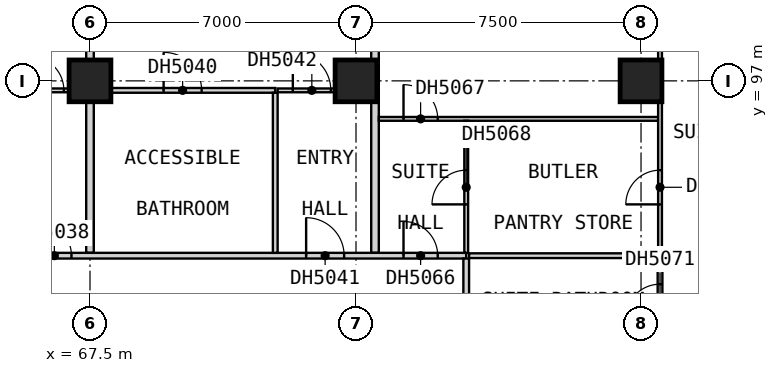
"""IFC4 building model, lengths in metres.
Left out: names, types, materials, properties, quantities, classifications, styles, units other than length and angle.
Written with IfcOpenShell. Run it as: python <this file> out.ifc"""

import sys

from ifc_helpers import new_model, si_unit, direction, frame, frame_2d, origin, origin_2d, place, context, subcontext, project, spatial, rectangle, extrude, element, fill, save


model = new_model("IFC4")
c1 = context("Model", 3, precision=1e-05, world=origin(), true_north=direction((0.0, 1.0)))
c2 = subcontext(c1, "Body", "Model", "MODEL_VIEW")
j1 = project(units=[si_unit("LENGTHUNIT", "METRE"), si_unit("PLANEANGLEUNIT", "RADIAN")], contexts=[c1])
p1 = place(None, origin())
s1 = spatial("IfcSite", under=j1, at=p1, CompositionType="ELEMENT")
p2 = place(p1, origin())
s2 = spatial("IfcBuilding", under=s1, at=p2, CompositionType="ELEMENT")
p3 = place(p2, frame((0.0, 0.0, 79.1)))
s3 = spatial("IfcBuildingStorey", under=s2, at=p3, CompositionType="ELEMENT", Elevation=79.1)
for number, where, z_axis, x_axis in (
    (1, (67.5, 97.0, 0.0), (0.0, 0.0, 1.0), (1.0, 0.0, 0.0)),
    (2, (74.5, 97.0, 0.0), (0.0, 0.0, 1.0), (1.0, 0.0, 0.0)),
    (3, (82.0, 97.0, 0.0), (0.0, 0.0, 1.0), (1.0, 0.0, 0.0)),
):
    element("IfcColumn", number, at=place(p3, frame(where, z_axis=z_axis, x_axis=x_axis)), inside=s3, PredefinedType="COLUMN", context=c2, shape_type="SweptSolid", body=[
        extrude(rectangle(XDim=1.1, YDim=1.1, at=origin_2d()), origin(), (0.0, 0.0, 1.0), 3.6),
    ])
p4 = place(p3, frame((67.5, 92.475, 0.0), z_axis=(0.0, 0.0, 1.0), x_axis=(0.0, 1.0, 0.0)))
e4 = element("IfcWall", 4, at=p4, inside=s3, PredefinedType="PARTITIONING", context=c2, shape_type="SweptSolid", body=[
    extrude(rectangle(XDim=12.525, YDim=0.2, at=frame_2d((6.262, 0.0))), origin(), (0.0, 0.0, 1.0), 3.35),
])
p5 = place(p3, frame((75.0, 92.475, 0.0), z_axis=(0.0, 0.0, 1.0), x_axis=(0.0, 1.0, 0.0)))
e5 = element("IfcWall", 5, at=p5, inside=s3, PredefinedType="PARTITIONING", context=c2, shape_type="SweptSolid", body=[
    extrude(rectangle(XDim=11.715, YDim=0.2, at=frame_2d((5.857, 0.0))), origin(), (0.0, 0.0, 1.0), 3.35),
])
p6 = place(p3, frame((33.75, 92.4, 0.0), z_axis=(0.0, 0.0, 1.0), x_axis=(1.0, 0.0, 0.0)))
e6 = element("IfcWall", 6, at=p6, inside=s3, PredefinedType="PARTITIONING", context=c2, shape_type="SweptSolid", body=[
    extrude(rectangle(XDim=43.65, YDim=0.15, at=frame_2d((21.825, 0.0))), origin(), (0.0, 0.0, 1.0), 3.35),
])
p7 = place(p6, frame((5.175, 0.0, 0.0)))
e7 = element("IfcOpeningElement", 7, at=p7, cuts=e6, PredefinedType="OPENING", context=c2, shape_type="SweptSolid", body=[
    extrude(rectangle(XDim=0.9, YDim=2.1, at=frame_2d((0.45, 1.05))), frame((0.0, 0.085, 0.0), z_axis=(0.0, -1.0, 0.0), x_axis=(1.0, 0.0, 0.0)), (0.0, 0.0, 1.0), 0.17),
])
p8 = place(p6, frame((13.05, 0.0, 0.0)))
e8 = element("IfcOpeningElement", 8, at=p8, cuts=e6, PredefinedType="OPENING", context=c2, shape_type="SweptSolid", body=[
    extrude(rectangle(XDim=0.9, YDim=2.1, at=frame_2d((0.45, 1.05))), frame((0.0, 0.085, 0.0), z_axis=(0.0, -1.0, 0.0), x_axis=(1.0, 0.0, 0.0)), (0.0, 0.0, 1.0), 0.17),
])
p9 = place(p6, frame((17.363, 0.0, 0.0)))
e9 = element("IfcOpeningElement", 9, at=p9, cuts=e6, PredefinedType="OPENING", context=c2, shape_type="SweptSolid", body=[
    extrude(rectangle(XDim=0.9, YDim=2.1, at=frame_2d((0.45, 1.05))), frame((0.0, 0.085, 0.0), z_axis=(0.0, -1.0, 0.0), x_axis=(1.0, 0.0, 0.0)), (0.0, 0.0, 1.0), 0.17),
])
p10 = place(p6, frame((24.3, 0.0, 0.0)))
e10 = element("IfcOpeningElement", 10, at=p10, cuts=e6, PredefinedType="OPENING", context=c2, shape_type="SweptSolid", body=[
    extrude(rectangle(XDim=0.9, YDim=2.1, at=frame_2d((0.45, 1.05))), frame((0.0, 0.085, 0.0), z_axis=(0.0, -1.0, 0.0), x_axis=(1.0, 0.0, 0.0)), (0.0, 0.0, 1.0), 0.17),
])
p11 = place(p6, frame((28.613, 0.0, 0.0)))
e11 = element("IfcOpeningElement", 11, at=p11, cuts=e6, PredefinedType="OPENING", context=c2, shape_type="SweptSolid", body=[
    extrude(rectangle(XDim=0.9, YDim=2.1, at=frame_2d((0.45, 1.05))), frame((0.0, 0.085, 0.0), z_axis=(0.0, -1.0, 0.0), x_axis=(1.0, 0.0, 0.0)), (0.0, 0.0, 1.0), 0.17),
])
p12 = place(p6, frame((32.363, 0.0, 0.0)))
e12 = element("IfcOpeningElement", 12, at=p12, cuts=e6, PredefinedType="OPENING", context=c2, shape_type="SweptSolid", body=[
    extrude(rectangle(XDim=0.9, YDim=2.1, at=frame_2d((0.45, 1.05))), frame((0.0, 0.085, 0.0), z_axis=(0.0, -1.0, 0.0), x_axis=(1.0, 0.0, 0.0)), (0.0, 0.0, 1.0), 0.17),
])
p13 = place(p6, frame((39.438, 0.0, 0.0)))
e13 = element("IfcOpeningElement", 13, at=p13, cuts=e6, PredefinedType="OPENING", context=c2, shape_type="SweptSolid", body=[
    extrude(rectangle(XDim=1.0, YDim=2.1, at=frame_2d((0.5, 1.05))), frame((0.0, 0.085, 0.0), z_axis=(0.0, -1.0, 0.0), x_axis=(1.0, 0.0, 0.0)), (0.0, 0.0, 1.0), 0.17),
])
p14 = place(p6, frame((42.0, 0.0, 0.0)))
e14 = element("IfcOpeningElement", 14, at=p14, cuts=e6, PredefinedType="OPENING", context=c2, shape_type="SweptSolid", body=[
    extrude(rectangle(XDim=0.9, YDim=2.1, at=frame_2d((0.45, 1.05))), frame((0.0, 0.085, 0.0), z_axis=(0.0, -1.0, 0.0), x_axis=(1.0, 0.0, 0.0)), (0.0, 0.0, 1.0), 0.17),
])
p15 = place(p3, frame((77.4, 50.175, 0.0), z_axis=(0.0, 0.0, 1.0), x_axis=(0.0, 1.0, 0.0)))
e15 = element("IfcWall", 15, at=p15, inside=s3, PredefinedType="PARTITIONING", context=c2, shape_type="SweptSolid", body=[
    extrude(rectangle(XDim=42.15, YDim=0.15, at=frame_2d((21.075, 0.0))), origin(), (0.0, 0.0, 1.0), 3.35),
])
p16 = place(p15, frame((4.125, 0.0, 0.0)))
e16 = element("IfcOpeningElement", 16, at=p16, cuts=e15, PredefinedType="OPENING", context=c2, shape_type="SweptSolid", body=[
    extrude(rectangle(XDim=0.9, YDim=2.1, at=frame_2d((0.45, 1.05))), frame((0.0, 0.085, 0.0), z_axis=(0.0, -1.0, 0.0), x_axis=(1.0, 0.0, 0.0)), (0.0, 0.0, 1.0), 0.17),
])
p17 = place(p15, frame((19.125, 0.0, 0.0)))
e17 = element("IfcOpeningElement", 17, at=p17, cuts=e15, PredefinedType="OPENING", context=c2, shape_type="SweptSolid", body=[
    extrude(rectangle(XDim=0.9, YDim=2.1, at=frame_2d((0.45, 1.05))), frame((0.0, 0.085, 0.0), z_axis=(0.0, -1.0, 0.0), x_axis=(1.0, 0.0, 0.0)), (0.0, 0.0, 1.0), 0.17),
])
p18 = place(p15, frame((26.625, 0.0, 0.0)))
e18 = element("IfcOpeningElement", 18, at=p18, cuts=e15, PredefinedType="OPENING", context=c2, shape_type="SweptSolid", body=[
    extrude(rectangle(XDim=0.9, YDim=2.1, at=frame_2d((0.45, 1.05))), frame((0.0, 0.085, 0.0), z_axis=(0.0, -1.0, 0.0), x_axis=(1.0, 0.0, 0.0)), (0.0, 0.0, 1.0), 0.17),
])
p19 = place(p15, frame((30.938, 0.0, 0.0)))
e19 = element("IfcOpeningElement", 19, at=p19, cuts=e15, PredefinedType="OPENING", context=c2, shape_type="SweptSolid", body=[
    extrude(rectangle(XDim=0.9, YDim=2.1, at=frame_2d((0.45, 1.05))), frame((0.0, 0.085, 0.0), z_axis=(0.0, -1.0, 0.0), x_axis=(1.0, 0.0, 0.0)), (0.0, 0.0, 1.0), 0.17),
])
p20 = place(p15, frame((38.012, 0.0, 0.0)))
e20 = element("IfcOpeningElement", 20, at=p20, cuts=e15, PredefinedType="OPENING", context=c2, shape_type="SweptSolid", body=[
    extrude(rectangle(XDim=1.0, YDim=2.1, at=frame_2d((0.5, 1.05))), frame((0.0, 0.085, 0.0), z_axis=(0.0, -1.0, 0.0), x_axis=(1.0, 0.0, 0.0)), (0.0, 0.0, 1.0), 0.17),
])
p21 = place(p3, frame((75.1, 96.0, 0.0), z_axis=(0.0, 0.0, 1.0), x_axis=(1.0, 0.0, 0.0)))
e21 = element("IfcWall", 21, at=p21, inside=s3, PredefinedType="PARTITIONING", context=c2, shape_type="SweptSolid", body=[
    extrude(rectangle(XDim=7.35, YDim=0.1, at=frame_2d((3.675, 0.0))), origin(), (0.0, 0.0, 1.0), 3.35),
])
p22 = place(p21, frame((0.65, 0.0, 0.0)))
e22 = element("IfcOpeningElement", 22, at=p22, cuts=e21, PredefinedType="OPENING", context=c2, shape_type="SweptSolid", body=[
    extrude(rectangle(XDim=0.9, YDim=2.1, at=frame_2d((0.45, 1.05))), frame((0.0, 0.06, 0.0), z_axis=(0.0, -1.0, 0.0), x_axis=(1.0, 0.0, 0.0)), (0.0, 0.0, 1.0), 0.12),
])
p23 = place(p3, frame((65.688, 96.75, 0.0), z_axis=(0.0, 0.0, 1.0), x_axis=(1.0, 0.0, 0.0)))
e23 = element("IfcWall", 23, at=p23, inside=s3, PredefinedType="PARTITIONING", context=c2, shape_type="SweptSolid", body=[
    extrude(rectangle(XDim=1.712, YDim=0.1, at=frame_2d((0.856, 0.0))), origin(), (0.0, 0.0, 1.0), 3.35),
])
p24 = place(p23, frame((0.225, 0.0, 0.0)))
e24 = element("IfcOpeningElement", 24, at=p24, cuts=e23, PredefinedType="OPENING", context=c2, shape_type="SweptSolid", body=[
    extrude(rectangle(XDim=0.9, YDim=2.1, at=frame_2d((0.45, 1.05))), frame((0.0, 0.06, 0.0), z_axis=(0.0, -1.0, 0.0), x_axis=(1.0, 0.0, 0.0)), (0.0, 0.0, 1.0), 0.12),
])
p25 = place(p3, frame((72.438, 96.75, 0.0), z_axis=(0.0, 0.0, 1.0), x_axis=(1.0, 0.0, 0.0)))
e25 = element("IfcWall", 25, at=p25, inside=s3, PredefinedType="PARTITIONING", context=c2, shape_type="SweptSolid", body=[
    extrude(rectangle(XDim=2.462, YDim=0.1, at=frame_2d((1.231, 0.0))), origin(), (0.0, 0.0, 1.0), 3.35),
])
p26 = place(p25, frame((0.4, 0.0, 0.0)))
e26 = element("IfcOpeningElement", 26, at=p26, cuts=e25, PredefinedType="OPENING", context=c2, shape_type="SweptSolid", body=[
    extrude(rectangle(XDim=1.0, YDim=2.1, at=frame_2d((0.5, 1.05))), frame((0.0, 0.06, 0.0), z_axis=(0.0, -1.0, 0.0), x_axis=(1.0, 0.0, 0.0)), (0.0, 0.0, 1.0), 0.12),
])
p27 = place(p3, frame((77.4, 92.475, 0.0), z_axis=(0.0, 0.0, 1.0), x_axis=(0.0, 1.0, 0.0)))
e27 = element("IfcWall", 27, at=p27, inside=s3, PredefinedType="PARTITIONING", context=c2, shape_type="SweptSolid", body=[
    extrude(rectangle(XDim=3.475, YDim=0.1, at=frame_2d((1.737, 0.0))), origin(), (0.0, 0.0, 1.0), 3.35),
])
p28 = place(p27, frame((1.275, 0.0, 0.0)))
e28 = element("IfcOpeningElement", 28, at=p28, cuts=e27, PredefinedType="OPENING", context=c2, shape_type="SweptSolid", body=[
    extrude(rectangle(XDim=0.9, YDim=2.1, at=frame_2d((0.45, 1.05))), frame((0.0, 0.06, 0.0), z_axis=(0.0, -1.0, 0.0), x_axis=(1.0, 0.0, 0.0)), (0.0, 0.0, 1.0), 0.12),
])
p29 = place(p3, frame((82.5, 92.462, 0.0), z_axis=(0.0, 0.0, 1.0), x_axis=(0.0, 1.0, 0.0)))
e29 = element("IfcWall", 29, at=p29, inside=s3, PredefinedType="PARTITIONING", context=c2, shape_type="SweptSolid", body=[
    extrude(rectangle(XDim=11.728, YDim=0.1, at=frame_2d((5.864, 0.0))), origin(), (0.0, 0.0, 1.0), 3.35),
])
p30 = place(p29, frame((10.212, 0.0, 0.0)))
e30 = element("IfcOpeningElement", 30, at=p30, cuts=e29, PredefinedType="OPENING", context=c2, shape_type="SweptSolid", body=[
    extrude(rectangle(XDim=0.9, YDim=2.1, at=frame_2d((0.45, 1.05))), frame((0.0, 0.06, 0.0), z_axis=(0.0, -1.0, 0.0), x_axis=(1.0, 0.0, 0.0)), (0.0, 0.0, 1.0), 0.12),
])
p31 = place(p29, frame((1.288, 0.0, 0.0)))
e31 = element("IfcOpeningElement", 31, at=p31, cuts=e29, PredefinedType="OPENING", context=c2, shape_type="SweptSolid", body=[
    extrude(rectangle(XDim=0.9, YDim=2.1, at=frame_2d((0.45, 1.05))), frame((0.0, 0.06, 0.0), z_axis=(0.0, -1.0, 0.0), x_axis=(1.0, 0.0, 0.0)), (0.0, 0.0, 1.0), 0.12),
])
p32 = place(p3, frame((77.475, 92.4, 0.0), z_axis=(0.0, 0.0, 1.0), x_axis=(1.0, 0.0, 0.0)))
e32 = element("IfcWall", 32, at=p32, inside=s3, PredefinedType="PARTITIONING", context=c2, shape_type="SweptSolid", body=[
    extrude(rectangle(XDim=5.025, YDim=0.125, at=frame_2d((2.512, 0.0))), origin(), (0.0, 0.0, 1.0), 3.35),
])
p33 = place(p3, frame((67.6, 96.75, 0.0), z_axis=(0.0, 0.0, 1.0), x_axis=(1.0, 0.0, 0.0)))
e33 = element("IfcWall", 33, at=p33, inside=s3, PredefinedType="PARTITIONING", context=c2, shape_type="SweptSolid", body=[
    extrude(rectangle(XDim=4.775, YDim=0.125, at=frame_2d((2.387, 0.0))), origin(), (0.0, 0.0, 1.0), 3.35),
])
p34 = place(p33, frame((1.837, 0.0, 0.0)))
e34 = element("IfcOpeningElement", 34, at=p34, cuts=e33, PredefinedType="OPENING", context=c2, shape_type="SweptSolid", body=[
    extrude(rectangle(XDim=1.0, YDim=2.1, at=frame_2d((0.5, 1.05))), frame((0.0, 0.073, 0.0), z_axis=(0.0, -1.0, 0.0), x_axis=(1.0, 0.0, 0.0)), (0.0, 0.0, 1.0), 0.145),
])
p35 = place(p3, frame((72.375, 92.475, 0.0), z_axis=(0.0, 0.0, 1.0), x_axis=(0.0, 1.0, 0.0)))
e35 = element("IfcWall", 35, at=p35, inside=s3, PredefinedType="PARTITIONING", context=c2, shape_type="SweptSolid", body=[
    extrude(rectangle(XDim=4.212, YDim=0.125, at=frame_2d((2.106, 0.0))), origin(), (0.0, 0.0, 1.0), 3.35),
])
p36 = place(p3, frame((82.5, 90.1, 0.0), z_axis=(0.0, 0.0, 1.0), x_axis=(0.0, 1.0, 0.0)))
e36 = element("IfcWall", 36, at=p36, inside=s3, PredefinedType="PARTITIONING", context=c2, shape_type="SweptSolid", body=[
    extrude(rectangle(XDim=2.237, YDim=0.125, at=frame_2d((1.119, 0.0))), origin(), (0.0, 0.0, 1.0), 3.35),
])
p37 = place(p36, frame((0.65, 0.0, 0.0)))
e37 = element("IfcOpeningElement", 37, at=p37, cuts=e36, PredefinedType="OPENING", context=c2, shape_type="SweptSolid", body=[
    extrude(rectangle(XDim=0.9, YDim=2.1, at=frame_2d((0.45, 1.05))), frame((0.0, 0.073, 0.0), z_axis=(0.0, -1.0, 0.0), x_axis=(1.0, 0.0, 0.0)), (0.0, 0.0, 1.0), 0.145),
])
p38 = place(p12, origin())
e38 = element("IfcDoor", 38, at=p38, inside=s3, OperationType="SINGLE_SWING_LEFT", PredefinedType="DOOR", context=c2, shape_type="SweptSolid", body=[
    extrude(rectangle(XDim=0.9, YDim=2.1, at=frame_2d((0.45, 1.05))), frame((0.0, 0.025, 0.0), z_axis=(0.0, -1.0, 0.0), x_axis=(1.0, 0.0, 0.0)), (0.0, 0.0, 1.0), 0.05),
])
fill(e12, e38)
p39 = place(p24, origin())
e39 = element("IfcDoor", 39, at=p39, inside=s3, OperationType="SINGLE_SWING_RIGHT", PredefinedType="DOOR", context=c2, shape_type="SweptSolid", body=[
    extrude(rectangle(XDim=0.9, YDim=2.1, at=frame_2d((0.45, 1.05))), frame((0.0, 0.025, 0.0), z_axis=(0.0, -1.0, 0.0), x_axis=(1.0, 0.0, 0.0)), (0.0, 0.0, 1.0), 0.05),
])
fill(e24, e39)
p40 = place(p34, origin())
e40 = element("IfcDoor", 40, at=p40, inside=s3, OperationType="SINGLE_SWING_RIGHT", PredefinedType="DOOR", context=c2, shape_type="SweptSolid", body=[
    extrude(rectangle(XDim=1.0, YDim=2.1, at=frame_2d((0.5, 1.05))), frame((0.0, 0.025, 0.0), z_axis=(0.0, -1.0, 0.0), x_axis=(1.0, 0.0, 0.0)), (0.0, 0.0, 1.0), 0.05),
])
fill(e34, e40)
p41 = place(p13, origin())
e41 = element("IfcDoor", 41, at=p41, inside=s3, OperationType="SINGLE_SWING_LEFT", PredefinedType="DOOR", context=c2, shape_type="SweptSolid", body=[
    extrude(rectangle(XDim=1.0, YDim=2.1, at=frame_2d((0.5, 1.05))), frame((0.0, 0.025, 0.0), z_axis=(0.0, -1.0, 0.0), x_axis=(1.0, 0.0, 0.0)), (0.0, 0.0, 1.0), 0.05),
])
fill(e13, e41)
p42 = place(p26, origin())
e42 = element("IfcDoor", 42, at=p42, inside=s3, OperationType="SINGLE_SWING_RIGHT", PredefinedType="DOOR", context=c2, shape_type="SweptSolid", body=[
    extrude(rectangle(XDim=1.0, YDim=2.1, at=frame_2d((0.5, 1.05))), frame((0.0, 0.025, 0.0), z_axis=(0.0, -1.0, 0.0), x_axis=(1.0, 0.0, 0.0)), (0.0, 0.0, 1.0), 0.05),
])
fill(e26, e42)
p43 = place(p14, origin())
e43 = element("IfcDoor", 43, at=p43, inside=s3, OperationType="SINGLE_SWING_RIGHT", PredefinedType="DOOR", context=c2, shape_type="SweptSolid", body=[
    extrude(rectangle(XDim=0.9, YDim=2.1, at=frame_2d((0.45, 1.05))), frame((0.0, 0.025, 0.0), z_axis=(0.0, -1.0, 0.0), x_axis=(1.0, 0.0, 0.0)), (0.0, 0.0, 1.0), 0.05),
])
fill(e14, e43)
p44 = place(p22, origin())
e44 = element("IfcDoor", 44, at=p44, inside=s3, OperationType="SINGLE_SWING_LEFT", PredefinedType="DOOR", context=c2, shape_type="SweptSolid", body=[
    extrude(rectangle(XDim=0.9, YDim=2.1, at=frame_2d((0.45, 1.05))), frame((0.0, 0.025, 0.0), z_axis=(0.0, -1.0, 0.0), x_axis=(1.0, 0.0, 0.0)), (0.0, 0.0, 1.0), 0.05),
])
fill(e22, e44)
p45 = place(p28, origin())
e45 = element("IfcDoor", 45, at=p45, inside=s3, OperationType="SINGLE_SWING_RIGHT", PredefinedType="DOOR", context=c2, shape_type="SweptSolid", body=[
    extrude(rectangle(XDim=0.9, YDim=2.1, at=frame_2d((0.45, 1.05))), frame((0.0, 0.025, 0.0), z_axis=(0.0, -1.0, 0.0), x_axis=(1.0, 0.0, 0.0)), (0.0, 0.0, 1.0), 0.05),
])
fill(e28, e45)
p46 = place(p31, origin())
e46 = element("IfcDoor", 46, at=p46, inside=s3, OperationType="SINGLE_SWING_RIGHT", PredefinedType="DOOR", context=c2, shape_type="SweptSolid", body=[
    extrude(rectangle(XDim=0.9, YDim=2.1, at=frame_2d((0.45, 1.05))), frame((0.0, 0.025, 0.0), z_axis=(0.0, -1.0, 0.0), x_axis=(1.0, 0.0, 0.0)), (0.0, 0.0, 1.0), 0.05),
])
fill(e31, e46)
p47 = place(p37, origin())
e47 = element("IfcDoor", 47, at=p47, inside=s3, OperationType="SINGLE_SWING_LEFT", PredefinedType="DOOR", context=c2, shape_type="SweptSolid", body=[
    extrude(rectangle(XDim=0.9, YDim=2.1, at=frame_2d((0.45, 1.05))), frame((0.0, 0.025, 0.0), z_axis=(0.0, -1.0, 0.0), x_axis=(1.0, 0.0, 0.0)), (0.0, 0.0, 1.0), 0.05),
])
fill(e37, e47)
save(model, sys.argv[1])
